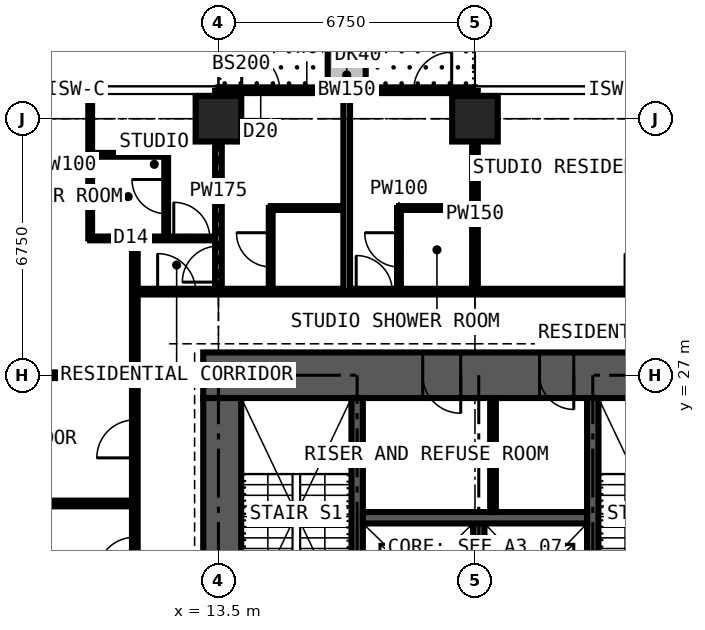
"""IFC4 building model, lengths in metres.
Left out: names, types, materials, properties, quantities, classifications, styles, units other than length and angle.
Written with IfcOpenShell. Run it as: python <this file> out.ifc"""

import sys

from ifc_helpers import new_model, si_unit, direction, frame, frame_2d, origin, origin_2d, place, context, subcontext, project, spatial, rectangle, extrude, element, fill, save


model = new_model("IFC4")
c1 = context("Model", 3, precision=1e-05, world=origin(), true_north=direction((0.0, 1.0)))
c2 = subcontext(c1, "Body", "Model", "MODEL_VIEW")
j1 = project(units=[si_unit("LENGTHUNIT", "METRE"), si_unit("PLANEANGLEUNIT", "RADIAN")], contexts=[c1])
p1 = place(None, origin())
s1 = spatial("IfcSite", under=j1, at=p1, CompositionType="ELEMENT")
p2 = place(p1, origin())
s2 = spatial("IfcBuilding", under=s1, at=p2, CompositionType="ELEMENT")
p3 = place(p2, frame((0.0, 0.0, 178.2)))
s3 = spatial("IfcBuildingStorey", under=s2, at=p3, CompositionType="ELEMENT", Elevation=178.2)
for number, where, z_axis, x_axis in (
    (1, (13.5, 33.75, 0.0), (0.0, 0.0, 1.0), (1.0, 0.0, 0.0)),
    (2, (20.25, 33.75, 0.0), (0.0, 0.0, 1.0), (1.0, 0.0, 0.0)),
):
    element("IfcColumn", number, at=place(p3, frame(where, z_axis=z_axis, x_axis=x_axis)), inside=s3, PredefinedType="COLUMN", context=c2, shape_type="SweptSolid", body=[
        extrude(rectangle(XDim=1.2, YDim=1.2, at=origin_2d()), origin(), (0.0, 0.0, 1.0), 3.6),
    ])
p4 = place(p3, frame((27.4, 27.0, 0.0), z_axis=(0.0, 0.0, 1.0), x_axis=(-1.0, 0.0, 0.0)))
e3 = element("IfcWall", 3, at=p4, inside=s3, PredefinedType="SHEAR", context=c2, shape_type="SweptSolid", body=[
    extrude(rectangle(XDim=14.3, YDim=1.2, at=frame_2d((7.15, 0.0))), origin(), (0.0, 0.0, 1.0), 3.6),
])
p5 = place(p4, frame((4.55, 0.0, 0.0)))
e4 = element("IfcOpeningElement", 4, at=p5, cuts=e3, PredefinedType="OPENING", context=c2, shape_type="SweptSolid", body=[
    extrude(rectangle(XDim=0.9, YDim=2.2, at=frame_2d((0.45, 1.1))), frame((0.0, 0.61, 0.0), z_axis=(0.0, -1.0, 0.0), x_axis=(1.0, 0.0, 0.0)), (0.0, 0.0, 1.0), 1.22),
])
p6 = place(p4, frame((7.525, 0.0, 0.0)))
e5 = element("IfcOpeningElement", 5, at=p6, cuts=e3, PredefinedType="OPENING", context=c2, shape_type="SweptSolid", body=[
    extrude(rectangle(XDim=1.0, YDim=2.2, at=frame_2d((0.5, 1.1))), frame((0.0, 0.61, 0.0), z_axis=(0.0, -1.0, 0.0), x_axis=(1.0, 0.0, 0.0)), (0.0, 0.0, 1.0), 1.22),
])
p7 = place(p3, frame((13.6, 26.4, 0.0), z_axis=(0.0, 0.0, 1.0), x_axis=(0.0, -1.0, 0.0)))
e6 = element("IfcWall", 6, at=p7, inside=s3, PredefinedType="SHEAR", context=c2, shape_type="SweptSolid", body=[
    extrude(rectangle(XDim=12.3, YDim=1.0, at=frame_2d((6.15, 0.0))), origin(), (0.0, 0.0, 1.0), 3.6),
])
p8 = place(p7, frame((7.45, 0.0, 0.0)))
e7 = element("IfcOpeningElement", 7, at=p8, cuts=e6, PredefinedType="OPENING", context=c2, shape_type="SweptSolid", body=[
    extrude(rectangle(XDim=1.2, YDim=2.2, at=frame_2d((0.6, 1.1))), frame((0.0, 0.51, 0.0), z_axis=(0.0, -1.0, 0.0), x_axis=(1.0, 0.0, 0.0)), (0.0, 0.0, 1.0), 1.02),
])
p9 = place(p3, frame((13.5, 34.5, 0.0), z_axis=(0.0, 0.0, 1.0), x_axis=(1.0, 0.0, 0.0)))
e8 = element("IfcWall", 8, at=p9, inside=s3, PredefinedType="SOLIDWALL", context=c2, shape_type="SweptSolid", body=[
    extrude(rectangle(XDim=6.75, YDim=0.15, at=frame_2d((3.375, 0.0))), origin(), (0.0, 0.0, 1.0), 3.375),
])
p10 = place(p9, frame((0.613, 0.0, 0.0)))
e9 = element("IfcOpeningElement", 9, at=p10, cuts=e8, PredefinedType="OPENING", context=c2, shape_type="SweptSolid", body=[
    extrude(rectangle(XDim=1.0, YDim=2.2, at=frame_2d((0.5, 1.1))), frame((0.0, 0.085, 0.0), z_axis=(0.0, -1.0, 0.0), x_axis=(1.0, 0.0, 0.0)), (0.0, 0.0, 1.0), 0.17),
])
p11 = place(p9, frame((1.725, 0.0, 0.9)))
e10 = element("IfcOpeningElement", 10, at=p11, cuts=e8, PredefinedType="OPENING", context=c2, shape_type="SweptSolid", body=[
    extrude(rectangle(XDim=1.2, YDim=1.8, at=frame_2d((0.6, 0.9))), frame((0.0, 0.085, 0.0), z_axis=(0.0, -1.0, 0.0), x_axis=(1.0, 0.0, 0.0)), (0.0, 0.0, 1.0), 0.17),
])
p12 = place(p9, frame((5.137, 0.0, 0.0)))
e11 = element("IfcOpeningElement", 11, at=p12, cuts=e8, PredefinedType="OPENING", context=c2, shape_type="SweptSolid", body=[
    extrude(rectangle(XDim=1.0, YDim=2.2, at=frame_2d((0.5, 1.1))), frame((0.0, 0.085, 0.0), z_axis=(0.0, -1.0, 0.0), x_axis=(1.0, 0.0, 0.0)), (0.0, 0.0, 1.0), 0.17),
])
p13 = place(p9, frame((3.825, 0.0, 0.9)))
e12 = element("IfcOpeningElement", 12, at=p13, cuts=e8, PredefinedType="OPENING", context=c2, shape_type="SweptSolid", body=[
    extrude(rectangle(XDim=1.2, YDim=1.8, at=frame_2d((0.6, 0.9))), frame((0.0, 0.085, 0.0), z_axis=(0.0, -1.0, 0.0), x_axis=(1.0, 0.0, 0.0)), (0.0, 0.0, 1.0), 0.17),
])
p14 = place(p3, frame((16.875, 34.6, 0.0), z_axis=(0.0, 0.0, 1.0), x_axis=(0.0, 1.0, 0.0)))
e13 = element("IfcWall", 13, at=p14, inside=s3, PredefinedType="USERDEFINED", context=c2, shape_type="SweptSolid", body=[
    extrude(rectangle(XDim=2.2, YDim=1.0, at=frame_2d((1.1, 0.0))), origin(), (0.0, 0.0, 1.0), 0.9),
])
for number, where, z_axis, x_axis in (
    (14, (17.15, 20.3, 0.0), (0.0, 0.0, 1.0), (0.0, 1.0, 0.0)),
    (15, (23.35, 20.3, 0.0), (0.0, 0.0, 1.0), (0.0, 1.0, 0.0)),
):
    element("IfcWall", number, at=place(p3, frame(where, z_axis=z_axis, x_axis=x_axis)), inside=s3, PredefinedType="SHEAR", context=c2, shape_type="SweptSolid", body=[
        extrude(rectangle(XDim=6.1, YDim=0.3, at=frame_2d((3.05, 0.0))), origin(), (0.0, 0.0, 1.0), 3.6),
    ])
p15 = place(p3, frame((20.35, 20.3, 0.0), z_axis=(0.0, 0.0, 1.0), x_axis=(0.0, 1.0, 0.0)))
e16 = element("IfcWall", 16, at=p15, inside=s3, PredefinedType="SHEAR", context=c2, shape_type="SweptSolid", body=[
    extrude(rectangle(XDim=2.8, YDim=0.3, at=frame_2d((1.4, 0.0))), origin(), (0.0, 0.0, 1.0), 3.6),
])
p16 = place(p3, frame((17.3, 23.25, 0.0), z_axis=(0.0, 0.0, 1.0), x_axis=(1.0, 0.0, 0.0)))
e17 = element("IfcWall", 17, at=p16, inside=s3, PredefinedType="SHEAR", context=c2, shape_type="SweptSolid", body=[
    extrude(rectangle(XDim=5.9, YDim=0.3, at=frame_2d((2.95, 0.0))), origin(), (0.0, 0.0, 1.0), 3.6),
])
p17 = place(p3, frame((20.725, 23.4, 0.0), z_axis=(0.0, 0.0, 1.0), x_axis=(0.0, 1.0, 0.0)))
e18 = element("IfcWall", 18, at=p17, inside=s3, PredefinedType="PARTITIONING", context=c2, shape_type="SweptSolid", body=[
    extrude(rectangle(XDim=3.0, YDim=0.15, at=frame_2d((1.5, 0.0))), origin(), (0.0, 0.0, 1.0), 3.375),
])
p18 = place(p3, frame((-0.734, 23.625, 0.0), z_axis=(0.0, 0.0, 1.0), x_axis=(1.0, 0.0, 0.0)))
e19 = element("IfcWall", 19, at=p18, inside=s3, PredefinedType="PARTITIONING", context=c2, shape_type="SweptSolid", body=[
    extrude(rectangle(XDim=12.034, YDim=0.15, at=frame_2d((6.017, 0.0))), origin(), (0.0, 0.0, 1.0), 3.375),
])
p19 = place(p3, frame((-0.734, 27.0, 0.0), z_axis=(0.0, 0.0, 1.0), x_axis=(1.0, 0.0, 0.0)))
e20 = element("IfcWall", 20, at=p19, inside=s3, PredefinedType="PARTITIONING", context=c2, shape_type="SweptSolid", body=[
    extrude(rectangle(XDim=12.034, YDim=0.15, at=frame_2d((6.017, 0.0))), origin(), (0.0, 0.0, 1.0), 2.806),
])
p20 = place(p19, frame((8.134, 0.0, 0.0)))
e21 = element("IfcOpeningElement", 21, at=p20, cuts=e20, PredefinedType="OPENING", context=c2, shape_type="SweptSolid", body=[
    extrude(rectangle(XDim=1.0, YDim=2.2, at=frame_2d((0.5, 1.1))), frame((0.0, 0.085, 0.0), z_axis=(0.0, -1.0, 0.0), x_axis=(1.0, 0.0, 0.0)), (0.0, 0.0, 1.0), 0.17),
])
p21 = place(p3, frame((10.125, 30.6, 0.0), z_axis=(0.0, 0.0, 1.0), x_axis=(0.0, 1.0, 0.0)))
e22 = element("IfcWall", 22, at=p21, inside=s3, PredefinedType="PARTITIONING", context=c2, shape_type="SweptSolid", body=[
    extrude(rectangle(XDim=3.884, YDim=0.1, at=frame_2d((1.942, 0.0))), origin(), (0.0, 0.0, 1.0), 3.375),
])
p22 = place(p3, frame((10.125, 30.6, 0.0), z_axis=(0.0, 0.0, 1.0), x_axis=(1.0, 0.0, 0.0)))
e23 = element("IfcWall", 23, at=p22, inside=s3, PredefinedType="PARTITIONING", context=c2, shape_type="SweptSolid", body=[
    extrude(rectangle(XDim=3.375, YDim=0.1, at=frame_2d((1.688, 0.0))), origin(), (0.0, 0.0, 1.0), 3.375),
])
p23 = place(p22, frame((2.2, 0.0, 0.0)))
e24 = element("IfcOpeningElement", 24, at=p23, cuts=e23, PredefinedType="OPENING", context=c2, shape_type="SweptSolid", body=[
    extrude(rectangle(XDim=0.95, YDim=2.2, at=frame_2d((0.475, 1.1))), frame((0.0, 0.06, 0.0), z_axis=(0.0, -1.0, 0.0), x_axis=(1.0, 0.0, 0.0)), (0.0, 0.0, 1.0), 0.12),
])
p24 = place(p3, frame((10.125, 32.8, 0.0), z_axis=(0.0, 0.0, 1.0), x_axis=(1.0, 0.0, 0.0)))
e25 = element("IfcWall", 25, at=p24, inside=s3, PredefinedType="PARTITIONING", context=c2, shape_type="SweptSolid", body=[
    extrude(rectangle(XDim=2.0, YDim=0.1, at=frame_2d((1.0, 0.0))), origin(), (0.0, 0.0, 1.0), 3.375),
])
p25 = place(p3, frame((11.3, 11.3, 0.0), z_axis=(0.0, 0.0, 1.0), x_axis=(0.0, 1.0, 0.0)))
e26 = element("IfcWall", 26, at=p25, inside=s3, PredefinedType="PARTITIONING", context=c2, shape_type="SweptSolid", body=[
    extrude(rectangle(XDim=19.3, YDim=0.15, at=frame_2d((9.65, 0.0))), origin(), (0.0, 0.0, 1.0), 3.375),
])
p26 = place(p25, frame((13.525, 0.0, 0.0)))
e27 = element("IfcOpeningElement", 27, at=p26, cuts=e26, PredefinedType="OPENING", context=c2, shape_type="SweptSolid", body=[
    extrude(rectangle(XDim=1.0, YDim=2.2, at=frame_2d((0.5, 1.1))), frame((0.0, 0.085, 0.0), z_axis=(0.0, -1.0, 0.0), x_axis=(1.0, 0.0, 0.0)), (0.0, 0.0, 1.0), 0.17),
])
p27 = place(p25, frame((10.438, 0.0, 0.0)))
e28 = element("IfcOpeningElement", 28, at=p27, cuts=e26, PredefinedType="OPENING", context=c2, shape_type="SweptSolid", body=[
    extrude(rectangle(XDim=1.0, YDim=2.2, at=frame_2d((0.5, 1.1))), frame((0.0, 0.085, 0.0), z_axis=(0.0, -1.0, 0.0), x_axis=(1.0, 0.0, 0.0)), (0.0, 0.0, 1.0), 0.17),
])
p28 = place(p3, frame((11.3, 29.2, 0.0), z_axis=(0.0, 0.0, 1.0), x_axis=(1.0, 0.0, 0.0)))
e29 = element("IfcWall", 29, at=p28, inside=s3, PredefinedType="PARTITIONING", context=c2, shape_type="SweptSolid", body=[
    extrude(rectangle(XDim=19.809, YDim=0.15, at=frame_2d((9.904, 0.0))), origin(), (0.0, 0.0, 1.0), 3.375),
])
p29 = place(p28, frame((12.9, 0.0, 0.0)))
e30 = element("IfcOpeningElement", 30, at=p29, cuts=e29, PredefinedType="OPENING", context=c2, shape_type="SweptSolid", body=[
    extrude(rectangle(XDim=1.0, YDim=2.2, at=frame_2d((0.5, 1.1))), frame((0.0, 0.085, 0.0), z_axis=(0.0, -1.0, 0.0), x_axis=(1.0, 0.0, 0.0)), (0.0, 0.0, 1.0), 0.17),
])
p30 = place(p28, frame((5.825, 0.0, 0.0)))
e31 = element("IfcOpeningElement", 31, at=p30, cuts=e29, PredefinedType="OPENING", context=c2, shape_type="SweptSolid", body=[
    extrude(rectangle(XDim=0.95, YDim=2.2, at=frame_2d((0.475, 1.1))), frame((0.0, 0.085, 0.0), z_axis=(0.0, -1.0, 0.0), x_axis=(1.0, 0.0, 0.0)), (0.0, 0.0, 1.0), 0.17),
])
p31 = place(p28, frame((0.6, 0.0, 0.0)))
e32 = element("IfcOpeningElement", 32, at=p31, cuts=e29, PredefinedType="OPENING", context=c2, shape_type="SweptSolid", body=[
    extrude(rectangle(XDim=1.0, YDim=2.2, at=frame_2d((0.5, 1.1))), frame((0.0, 0.085, 0.0), z_axis=(0.0, -1.0, 0.0), x_axis=(1.0, 0.0, 0.0)), (0.0, 0.0, 1.0), 0.17),
])
p32 = place(p3, frame((12.125, 30.6, 0.0), z_axis=(0.0, 0.0, 1.0), x_axis=(0.0, 1.0, 0.0)))
e33 = element("IfcWall", 33, at=p32, inside=s3, PredefinedType="PARTITIONING", context=c2, shape_type="SweptSolid", body=[
    extrude(rectangle(XDim=2.2, YDim=0.1, at=frame_2d((1.1, 0.0))), origin(), (0.0, 0.0, 1.0), 3.375),
])
p33 = place(p32, frame((0.65, 0.0, 0.0)))
e34 = element("IfcOpeningElement", 34, at=p33, cuts=e33, PredefinedType="OPENING", context=c2, shape_type="SweptSolid", body=[
    extrude(rectangle(XDim=0.9, YDim=2.2, at=frame_2d((0.45, 1.1))), frame((0.0, 0.06, 0.0), z_axis=(0.0, -1.0, 0.0), x_axis=(1.0, 0.0, 0.0)), (0.0, 0.0, 1.0), 0.12),
])
p34 = place(p3, frame((13.5, 29.2, 0.0), z_axis=(0.0, 0.0, 1.0), x_axis=(0.0, 1.0, 0.0)))
e35 = element("IfcWall", 35, at=p34, inside=s3, PredefinedType="PARTITIONING", context=c2, shape_type="SweptSolid", body=[
    extrude(rectangle(XDim=5.284, YDim=0.175, at=frame_2d((2.642, 0.0))), origin(), (0.0, 0.0, 1.0), 2.806),
])
p35 = place(p34, frame((0.25, 0.0, 0.0)))
e36 = element("IfcOpeningElement", 36, at=p35, cuts=e35, PredefinedType="OPENING", context=c2, shape_type="SweptSolid", body=[
    extrude(rectangle(XDim=0.95, YDim=2.2, at=frame_2d((0.475, 1.1))), frame((0.0, 0.097, 0.0), z_axis=(0.0, -1.0, 0.0), x_axis=(1.0, 0.0, 0.0)), (0.0, 0.0, 1.0), 0.195),
])
p36 = place(p3, frame((14.875, 29.2, 0.0), z_axis=(0.0, 0.0, 1.0), x_axis=(0.0, 1.0, 0.0)))
e37 = element("IfcWall", 37, at=p36, inside=s3, PredefinedType="PARTITIONING", context=c2, shape_type="SweptSolid", body=[
    extrude(rectangle(XDim=2.2, YDim=0.1, at=frame_2d((1.1, 0.0))), origin(), (0.0, 0.0, 1.0), 3.375),
])
p37 = place(p36, frame((0.65, 0.0, 0.0)))
e38 = element("IfcOpeningElement", 38, at=p37, cuts=e37, PredefinedType="OPENING", context=c2, shape_type="SweptSolid", body=[
    extrude(rectangle(XDim=0.9, YDim=2.2, at=frame_2d((0.45, 1.1))), frame((0.0, 0.06, 0.0), z_axis=(0.0, -1.0, 0.0), x_axis=(1.0, 0.0, 0.0)), (0.0, 0.0, 1.0), 0.12),
])
p38 = place(p3, frame((14.875, 31.4, 0.0), z_axis=(0.0, 0.0, 1.0), x_axis=(1.0, 0.0, 0.0)))
e39 = element("IfcWall", 39, at=p38, inside=s3, PredefinedType="PARTITIONING", context=c2, shape_type="SweptSolid", body=[
    extrude(rectangle(XDim=2.0, YDim=0.1, at=frame_2d((1.0, 0.0))), origin(), (0.0, 0.0, 1.0), 3.375),
])
p39 = place(p3, frame((16.875, 29.2, 0.0), z_axis=(0.0, 0.0, 1.0), x_axis=(0.0, 1.0, 0.0)))
e40 = element("IfcWall", 40, at=p39, inside=s3, PredefinedType="PARTITIONING", context=c2, shape_type="SweptSolid", body=[
    extrude(rectangle(XDim=5.284, YDim=0.175, at=frame_2d((2.642, 0.0))), origin(), (0.0, 0.0, 1.0), 3.375),
])
p40 = place(p3, frame((18.25, 29.2, 0.0), z_axis=(0.0, 0.0, 1.0), x_axis=(0.0, 1.0, 0.0)))
e41 = element("IfcWall", 41, at=p40, inside=s3, PredefinedType="PARTITIONING", context=c2, shape_type="SweptSolid", body=[
    extrude(rectangle(XDim=2.2, YDim=0.1, at=frame_2d((1.1, 0.0))), origin(), (0.0, 0.0, 1.0), 3.375),
])
p41 = place(p40, frame((0.65, 0.0, 0.0)))
e42 = element("IfcOpeningElement", 42, at=p41, cuts=e41, PredefinedType="OPENING", context=c2, shape_type="SweptSolid", body=[
    extrude(rectangle(XDim=0.9, YDim=2.2, at=frame_2d((0.45, 1.1))), frame((0.0, 0.06, 0.0), z_axis=(0.0, -1.0, 0.0), x_axis=(1.0, 0.0, 0.0)), (0.0, 0.0, 1.0), 0.12),
])
p42 = place(p3, frame((18.25, 31.4, 0.0), z_axis=(0.0, 0.0, 1.0), x_axis=(1.0, 0.0, 0.0)))
e43 = element("IfcWall", 43, at=p42, inside=s3, PredefinedType="PARTITIONING", context=c2, shape_type="SweptSolid", body=[
    extrude(rectangle(XDim=2.0, YDim=0.1, at=frame_2d((1.0, 0.0))), origin(), (0.0, 0.0, 1.0), 3.375),
])
p43 = place(p3, frame((20.25, 29.2, 0.0), z_axis=(0.0, 0.0, 1.0), x_axis=(0.0, 1.0, 0.0)))
e44 = element("IfcWall", 44, at=p43, inside=s3, PredefinedType="PARTITIONING", context=c2, shape_type="SweptSolid", body=[
    extrude(rectangle(XDim=5.284, YDim=0.15, at=frame_2d((2.642, 0.0))), origin(), (0.0, 0.0, 1.0), 2.806),
])
p44 = place(p10, origin())
e45 = element("IfcDoor", 45, at=p44, inside=s3, OperationType="SINGLE_SWING_LEFT", PredefinedType="DOOR", context=c2, shape_type="SweptSolid", body=[
    extrude(rectangle(XDim=1.0, YDim=2.2, at=frame_2d((0.5, 1.1))), frame((0.0, 0.025, 0.0), z_axis=(0.0, -1.0, 0.0), x_axis=(1.0, 0.0, 0.0)), (0.0, 0.0, 1.0), 0.05),
])
fill(e9, e45)
p45 = place(p11, origin())
e46 = element("IfcWindow", 46, at=p45, inside=s3, PartitioningType="SINGLE_PANEL", PredefinedType="WINDOW", context=c2, shape_type="SweptSolid", body=[
    extrude(rectangle(XDim=1.2, YDim=1.8, at=frame_2d((0.6, 0.9))), frame((0.0, 0.03, 0.0), z_axis=(0.0, -1.0, 0.0), x_axis=(1.0, 0.0, 0.0)), (0.0, 0.0, 1.0), 0.06),
])
fill(e10, e46)
p46 = place(p12, origin())
e47 = element("IfcDoor", 47, at=p46, inside=s3, OperationType="SINGLE_SWING_RIGHT", PredefinedType="DOOR", context=c2, shape_type="SweptSolid", body=[
    extrude(rectangle(XDim=1.0, YDim=2.2, at=frame_2d((0.5, 1.1))), frame((0.0, 0.025, 0.0), z_axis=(0.0, -1.0, 0.0), x_axis=(1.0, 0.0, 0.0)), (0.0, 0.0, 1.0), 0.05),
])
fill(e11, e47)
p47 = place(p13, origin())
e48 = element("IfcWindow", 48, at=p47, inside=s3, PartitioningType="SINGLE_PANEL", PredefinedType="WINDOW", context=c2, shape_type="SweptSolid", body=[
    extrude(rectangle(XDim=1.2, YDim=1.8, at=frame_2d((0.6, 0.9))), frame((0.0, 0.03, 0.0), z_axis=(0.0, -1.0, 0.0), x_axis=(1.0, 0.0, 0.0)), (0.0, 0.0, 1.0), 0.06),
])
fill(e12, e48)
p48 = place(p5, origin())
e49 = element("IfcDoor", 49, at=p48, inside=s3, OperationType="SINGLE_SWING_LEFT", PredefinedType="DOOR", context=c2, shape_type="SweptSolid", body=[
    extrude(rectangle(XDim=0.9, YDim=2.2, at=frame_2d((0.45, 1.1))), frame((0.0, 0.4, 0.0), z_axis=(0.0, -1.0, 0.0), x_axis=(1.0, 0.0, 0.0)), (0.0, 0.0, 1.0), 0.8),
])
fill(e4, e49)
p49 = place(p6, origin())
e50 = element("IfcDoor", 50, at=p49, inside=s3, OperationType="SINGLE_SWING_LEFT", PredefinedType="DOOR", context=c2, shape_type="SweptSolid", body=[
    extrude(rectangle(XDim=1.0, YDim=2.2, at=frame_2d((0.5, 1.1))), frame((0.0, 0.025, 0.0), z_axis=(0.0, -1.0, 0.0), x_axis=(1.0, 0.0, 0.0)), (0.0, 0.0, 1.0), 0.05),
])
fill(e5, e50)
p50 = place(p23, origin())
e51 = element("IfcDoor", 51, at=p50, inside=s3, OperationType="SINGLE_SWING_LEFT", PredefinedType="DOOR", context=c2, shape_type="SweptSolid", body=[
    extrude(rectangle(XDim=0.95, YDim=2.2, at=frame_2d((0.475, 1.1))), frame((0.0, 0.025, 0.0), z_axis=(0.0, -1.0, 0.0), x_axis=(1.0, 0.0, 0.0)), (0.0, 0.0, 1.0), 0.05),
])
fill(e24, e51)
p51 = place(p33, origin())
e52 = element("IfcDoor", 52, at=p51, inside=s3, OperationType="SINGLE_SWING_RIGHT", PredefinedType="DOOR", context=c2, shape_type="SweptSolid", body=[
    extrude(rectangle(XDim=0.9, YDim=2.2, at=frame_2d((0.45, 1.1))), frame((0.0, 0.025, 0.0), z_axis=(0.0, -1.0, 0.0), x_axis=(1.0, 0.0, 0.0)), (0.0, 0.0, 1.0), 0.05),
])
fill(e34, e52)
p52 = place(p35, origin())
e53 = element("IfcDoor", 53, at=p52, inside=s3, OperationType="SINGLE_SWING_LEFT", PredefinedType="DOOR", context=c2, shape_type="SweptSolid", body=[
    extrude(rectangle(XDim=0.95, YDim=2.2, at=frame_2d((0.475, 1.1))), frame((0.0, 0.025, 0.0), z_axis=(0.0, -1.0, 0.0), x_axis=(1.0, 0.0, 0.0)), (0.0, 0.0, 1.0), 0.05),
])
fill(e36, e53)
p53 = place(p37, origin())
e54 = element("IfcDoor", 54, at=p53, inside=s3, OperationType="SINGLE_SWING_RIGHT", PredefinedType="DOOR", context=c2, shape_type="SweptSolid", body=[
    extrude(rectangle(XDim=0.9, YDim=2.2, at=frame_2d((0.45, 1.1))), frame((0.0, 0.025, 0.0), z_axis=(0.0, -1.0, 0.0), x_axis=(1.0, 0.0, 0.0)), (0.0, 0.0, 1.0), 0.05),
])
fill(e38, e54)
p54 = place(p30, origin())
e55 = element("IfcDoor", 55, at=p54, inside=s3, OperationType="SINGLE_SWING_LEFT", PredefinedType="DOOR", context=c2, shape_type="SweptSolid", body=[
    extrude(rectangle(XDim=0.95, YDim=2.2, at=frame_2d((0.475, 1.1))), frame((0.0, 0.025, 0.0), z_axis=(0.0, -1.0, 0.0), x_axis=(1.0, 0.0, 0.0)), (0.0, 0.0, 1.0), 0.05),
])
fill(e31, e55)
p55 = place(p41, origin())
e56 = element("IfcDoor", 56, at=p55, inside=s3, OperationType="SINGLE_SWING_RIGHT", PredefinedType="DOOR", context=c2, shape_type="SweptSolid", body=[
    extrude(rectangle(XDim=0.9, YDim=2.2, at=frame_2d((0.45, 1.1))), frame((0.0, 0.025, 0.0), z_axis=(0.0, -1.0, 0.0), x_axis=(1.0, 0.0, 0.0)), (0.0, 0.0, 1.0), 0.05),
])
fill(e42, e56)
p56 = place(p31, origin())
e57 = element("IfcDoor", 57, at=p56, inside=s3, OperationType="SINGLE_SWING_LEFT", PredefinedType="DOOR", context=c2, shape_type="SweptSolid", body=[
    extrude(rectangle(XDim=1.0, YDim=2.2, at=frame_2d((0.5, 1.1))), frame((0.0, 0.025, 0.0), z_axis=(0.0, -1.0, 0.0), x_axis=(1.0, 0.0, 0.0)), (0.0, 0.0, 1.0), 0.05),
])
fill(e32, e57)
p57 = place(p26, origin())
e58 = element("IfcDoor", 58, at=p57, inside=s3, OperationType="SINGLE_SWING_LEFT", PredefinedType="DOOR", context=c2, shape_type="SweptSolid", body=[
    extrude(rectangle(XDim=1.0, YDim=2.2, at=frame_2d((0.5, 1.1))), frame((0.0, 0.025, 0.0), z_axis=(0.0, -1.0, 0.0), x_axis=(1.0, 0.0, 0.0)), (0.0, 0.0, 1.0), 0.05),
])
fill(e27, e58)
p58 = place(p27, origin())
e59 = element("IfcDoor", 59, at=p58, inside=s3, OperationType="SINGLE_SWING_LEFT", PredefinedType="DOOR", context=c2, shape_type="SweptSolid", body=[
    extrude(rectangle(XDim=1.0, YDim=2.2, at=frame_2d((0.5, 1.1))), frame((0.0, 0.025, 0.0), z_axis=(0.0, -1.0, 0.0), x_axis=(1.0, 0.0, 0.0)), (0.0, 0.0, 1.0), 0.05),
])
fill(e28, e59)
save(model, sys.argv[1])
